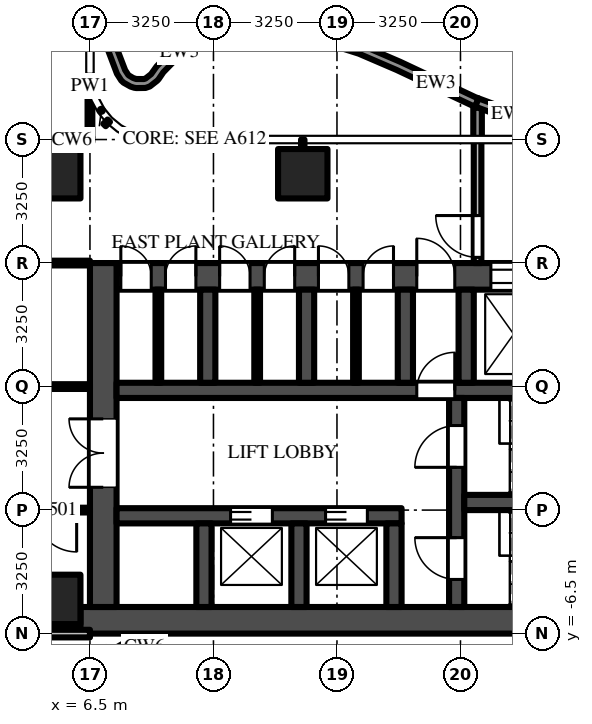
"""IFC4 building model, lengths in metres.
Left out: names, types, materials, properties, quantities, classifications, styles, units other than length and angle.
Written with IfcOpenShell. Run it as: python <this file> out.ifc"""

import sys

from ifc_helpers import new_model, si_unit, direction, frame, frame_2d, origin, origin_2d, place, context, subcontext, project, spatial, polyline, rectangle, outline, extrude, source, transform, mapped, element, fill, save


model = new_model("IFC4")
c1 = context("Model", 3, precision=1e-05, world=origin(), true_north=direction((0.0, 1.0)))
c2 = subcontext(c1, "Body", "Model", "MODEL_VIEW")
j1 = project(units=[si_unit("LENGTHUNIT", "METRE"), si_unit("PLANEANGLEUNIT", "RADIAN")], contexts=[c1])
p1 = place(None, origin())
s1 = spatial("IfcSite", under=j1, at=p1, CompositionType="ELEMENT")
p2 = place(p1, origin())
s2 = spatial("IfcBuilding", under=s1, at=p2, CompositionType="ELEMENT")
p3 = place(p2, frame((0.0, 0.0, 92.5)))
s3 = spatial("IfcBuildingStorey", under=s2, at=p3, CompositionType="ELEMENT", Elevation=92.5)
m1 = source(origin(), c2, "Body", "SweptSolid", [
    extrude(rectangle(XDim=1.3, YDim=1.3, at=origin_2d()), origin(), (0.0, 0.0, 1.0), 5.0),
])
for number, where, z_axis, x_axis in (
    (1, (12.1, 5.6, 0.0), (0.0, 0.0, 1.0), (1.0, 0.0, 0.0)),
    (2, (5.6, 5.6, 0.0), (0.0, 0.0, 1.0), (1.0, 0.0, 0.0)),
    (3, (5.6, -5.6, 0.0), (0.0, 0.0, 1.0), (1.0, 0.0, 0.0)),
):
    element("IfcColumn", number, at=place(p3, frame(where, z_axis=z_axis, x_axis=x_axis)), inside=s3, PredefinedType="COLUMN", context=c2, shape_type="MappedRepresentation", body=[
        mapped(m1, transform((0.0, 0.0, 0.0))),
    ])
m2 = source(origin(), c2, "Body", "SweptSolid", [
    extrude(rectangle(XDim=16.5, YDim=0.7, at=frame_2d((8.25, 0.0))), origin(), (0.0, 0.0, 1.0), 4.75),
])
p4 = place(p3, frame((6.25, -6.15, 0.0), z_axis=(0.0, 0.0, 1.0), x_axis=(1.0, 0.0, 0.0)))
e4 = element("IfcWall", 4, at=p4, inside=s3, PredefinedType="SHEAR", context=c2, shape_type="MappedRepresentation", body=[
    mapped(m2, transform((0.0, 0.0, 0.0))),
])
m3 = source(origin(), c2, "Body", "SweptSolid", [
    extrude(rectangle(XDim=14.85, YDim=0.7, at=frame_2d((7.425, 0.0))), origin(), (0.0, 0.0, 1.0), 4.75),
])
p5 = place(p3, frame((7.2, 2.9, 0.0), z_axis=(0.0, 0.0, 1.0), x_axis=(1.0, 0.0, 0.0)))
e5 = element("IfcWall", 5, at=p5, inside=s3, PredefinedType="SHEAR", context=c2, shape_type="MappedRepresentation", body=[
    mapped(m3, transform((0.0, 0.0, 0.0))),
])
m4 = source(origin(), c2, "Body", "SweptSolid", [
    extrude(rectangle(XDim=1.3, YDim=2.1, at=frame_2d((0.65, 1.05))), frame((0.0, 0.36, 0.0), z_axis=(0.0, -1.0, 0.0), x_axis=(1.0, 0.0, 0.0)), (0.0, 0.0, 1.0), 0.72),
])
p6 = place(p5, frame((12.2, 0.0, 0.0)))
e6 = element("IfcOpeningElement", 6, at=p6, cuts=e5, PredefinedType="OPENING", context=c2, shape_type="MappedRepresentation", body=[
    mapped(m4, transform((0.0, 0.0, 0.0))),
])
m5 = source(origin(), c2, "Body", "SweptSolid", [
    extrude(rectangle(XDim=1.2, YDim=2.1, at=frame_2d((0.6, 1.05))), frame((0.0, 0.36, 0.0), z_axis=(0.0, -1.0, 0.0), x_axis=(1.0, 0.0, 0.0)), (0.0, 0.0, 1.0), 0.72),
])
p7 = place(p5, frame((9.85, 0.0, 0.0)))
e7 = element("IfcOpeningElement", 7, at=p7, cuts=e5, PredefinedType="OPENING", context=c2, shape_type="MappedRepresentation", body=[
    mapped(m5, transform((0.0, 0.0, 0.0))),
])
m6 = source(origin(), c2, "Body", "SweptSolid", [
    extrude(rectangle(XDim=1.0, YDim=2.1, at=frame_2d((0.5, 1.05))), frame((0.0, 0.36, 0.0), z_axis=(0.0, -1.0, 0.0), x_axis=(1.0, 0.0, 0.0)), (0.0, 0.0, 1.0), 0.72),
])
p8 = place(p5, frame((7.9, 0.0, 0.0)))
e8 = element("IfcOpeningElement", 8, at=p8, cuts=e5, PredefinedType="OPENING", context=c2, shape_type="MappedRepresentation", body=[
    mapped(m6, transform((0.0, 0.0, 0.0))),
])
m7 = source(origin(), c2, "Body", "SweptSolid", [
    extrude(rectangle(XDim=0.8, YDim=2.1, at=frame_2d((0.4, 1.05))), frame((0.0, 0.36, 0.0), z_axis=(0.0, -1.0, 0.0), x_axis=(1.0, 0.0, 0.0)), (0.0, 0.0, 1.0), 0.72),
])
p9 = place(p5, frame((0.113, 0.0, 0.0)))
e9 = element("IfcOpeningElement", 9, at=p9, cuts=e5, PredefinedType="OPENING", context=c2, shape_type="MappedRepresentation", body=[
    mapped(m7, transform((0.0, 0.0, 0.0))),
])
p10 = place(p5, frame((1.288, 0.0, 0.0)))
e10 = element("IfcOpeningElement", 10, at=p10, cuts=e5, PredefinedType="OPENING", context=c2, shape_type="MappedRepresentation", body=[
    mapped(m7, transform((0.0, 0.0, 0.0))),
])
p11 = place(p5, frame((2.712, 0.0, 0.0)))
e11 = element("IfcOpeningElement", 11, at=p11, cuts=e5, PredefinedType="OPENING", context=c2, shape_type="MappedRepresentation", body=[
    mapped(m7, transform((0.0, 0.0, 0.0))),
])
p12 = place(p5, frame((3.887, 0.0, 0.0)))
e12 = element("IfcOpeningElement", 12, at=p12, cuts=e5, PredefinedType="OPENING", context=c2, shape_type="MappedRepresentation", body=[
    mapped(m7, transform((0.0, 0.0, 0.0))),
])
p13 = place(p5, frame((5.312, 0.0, 0.0)))
e13 = element("IfcOpeningElement", 13, at=p13, cuts=e5, PredefinedType="OPENING", context=c2, shape_type="MappedRepresentation", body=[
    mapped(m7, transform((0.0, 0.0, 0.0))),
])
p14 = place(p5, frame((6.488, 0.0, 0.0)))
e14 = element("IfcOpeningElement", 14, at=p14, cuts=e5, PredefinedType="OPENING", context=c2, shape_type="MappedRepresentation", body=[
    mapped(m7, transform((0.0, 0.0, 0.0))),
])
m8 = source(origin(), c2, "Body", "SweptSolid", [
    extrude(rectangle(XDim=9.05, YDim=0.7, at=frame_2d((4.525, 0.0))), origin(), (0.0, 0.0, 1.0), 4.75),
])
p15 = place(p3, frame((6.85, -5.8, 0.0), z_axis=(0.0, 0.0, 1.0), x_axis=(0.0, 1.0, 0.0)))
e15 = element("IfcWall", 15, at=p15, inside=s3, PredefinedType="SHEAR", context=c2, shape_type="MappedRepresentation", body=[
    mapped(m8, transform((0.0, 0.0, 0.0))),
])
m9 = source(origin(), c2, "Body", "SweptSolid", [
    extrude(rectangle(XDim=1.8, YDim=2.1, at=frame_2d((0.9, 1.05))), frame((0.0, 0.36, 0.0), z_axis=(0.0, -1.0, 0.0), x_axis=(1.0, 0.0, 0.0)), (0.0, 0.0, 1.0), 0.72),
])
p16 = place(p15, frame((3.15, 0.0, 0.0)))
e16 = element("IfcOpeningElement", 16, at=p16, cuts=e15, PredefinedType="OPENING", context=c2, shape_type="MappedRepresentation", body=[
    mapped(m9, transform((0.0, 0.0, 0.0))),
])
m10 = source(origin(), c2, "Body", "SweptSolid", [
    extrude(rectangle(XDim=7.5, YDim=0.4, at=frame_2d((3.75, 0.0))), origin(), (0.0, 0.0, 1.0), 4.75),
])
p17 = place(p3, frame((7.2, -3.4, 0.0), z_axis=(0.0, 0.0, 1.0), x_axis=(1.0, 0.0, 0.0)))
e17 = element("IfcWall", 17, at=p17, inside=s3, PredefinedType="SHEAR", context=c2, shape_type="MappedRepresentation", body=[
    mapped(m10, transform((0.0, 0.0, 0.0))),
])
m11 = source(origin(), c2, "Body", "SweptSolid", [
    extrude(rectangle(XDim=1.1, YDim=2.1, at=frame_2d((0.55, 1.05))), frame((0.0, 0.21, 0.0), z_axis=(0.0, -1.0, 0.0), x_axis=(1.0, 0.0, 0.0)), (0.0, 0.0, 1.0), 0.42),
])
p18 = place(p17, frame((3.0, 0.0, 0.0)))
e18 = element("IfcOpeningElement", 18, at=p18, cuts=e17, PredefinedType="OPENING", context=c2, shape_type="MappedRepresentation", body=[
    mapped(m11, transform((0.0, 0.0, 0.0))),
])
p19 = place(p17, frame((5.5, 0.0, 0.0)))
e19 = element("IfcOpeningElement", 19, at=p19, cuts=e17, PredefinedType="OPENING", context=c2, shape_type="MappedRepresentation", body=[
    mapped(m11, transform((0.0, 0.0, 0.0))),
])
m12 = source(origin(), c2, "Body", "SweptSolid", [
    extrude(rectangle(XDim=14.85, YDim=0.4, at=frame_2d((7.425, 0.0))), origin(), (0.0, 0.0, 1.0), 4.75),
])
p20 = place(p3, frame((7.2, -0.1, 0.0), z_axis=(0.0, 0.0, 1.0), x_axis=(1.0, 0.0, 0.0)))
e20 = element("IfcWall", 20, at=p20, inside=s3, PredefinedType="SHEAR", context=c2, shape_type="MappedRepresentation", body=[
    mapped(m12, transform((0.0, 0.0, 0.0))),
])
m13 = source(origin(), c2, "Body", "SweptSolid", [
    extrude(rectangle(XDim=1.0, YDim=2.1, at=frame_2d((0.5, 1.05))), frame((0.0, 0.21, 0.0), z_axis=(0.0, -1.0, 0.0), x_axis=(1.0, 0.0, 0.0)), (0.0, 0.0, 1.0), 0.42),
])
p21 = place(p20, frame((7.9, 0.0, 0.0)))
e21 = element("IfcOpeningElement", 21, at=p21, cuts=e20, PredefinedType="OPENING", context=c2, shape_type="MappedRepresentation", body=[
    mapped(m13, transform((0.0, 0.0, 0.0))),
])
m14 = source(origin(), c2, "Body", "SweptSolid", [
    extrude(rectangle(XDim=5.5, YDim=0.4, at=frame_2d((2.75, 0.0))), origin(), (0.0, 0.0, 1.0), 4.75),
])
p22 = place(p3, frame((16.15, -5.8, 0.0), z_axis=(0.0, 0.0, 1.0), x_axis=(0.0, 1.0, 0.0)))
e22 = element("IfcWall", 22, at=p22, inside=s3, PredefinedType="SHEAR", context=c2, shape_type="MappedRepresentation", body=[
    mapped(m14, transform((0.0, 0.0, 0.0))),
])
p23 = place(p22, frame((0.725, 0.0, 0.0)))
e23 = element("IfcOpeningElement", 23, at=p23, cuts=e22, PredefinedType="OPENING", context=c2, shape_type="MappedRepresentation", body=[
    mapped(m11, transform((0.0, 0.0, 0.0))),
])
p24 = place(p22, frame((3.675, 0.0, 0.0)))
e24 = element("IfcOpeningElement", 24, at=p24, cuts=e22, PredefinedType="OPENING", context=c2, shape_type="MappedRepresentation", body=[
    mapped(m11, transform((0.0, 0.0, 0.0))),
])
m15 = source(origin(), c2, "Body", "SweptSolid", [
    extrude(rectangle(XDim=5.7, YDim=0.4, at=frame_2d((2.85, 0.0))), origin(), (0.0, 0.0, 1.0), 4.75),
])
p25 = place(p3, frame((16.35, -3.05, 0.0), z_axis=(0.0, 0.0, 1.0), x_axis=(1.0, 0.0, 0.0)))
e25 = element("IfcWall", 25, at=p25, inside=s3, PredefinedType="SHEAR", context=c2, shape_type="MappedRepresentation", body=[
    mapped(m15, transform((0.0, 0.0, 0.0))),
])
m16 = source(origin(), c2, "Body", "SweptSolid", [
    extrude(rectangle(XDim=2.2, YDim=0.4, at=frame_2d((1.1, 0.0))), origin(), (0.0, 0.0, 1.0), 4.75),
])
for number, where, z_axis, x_axis in (
    (26, (9.5, -5.8, 0.0), (0.0, 0.0, 1.0), (0.0, 1.0, 0.0)),
    (27, (12.0, -5.8, 0.0), (0.0, 0.0, 1.0), (0.0, 1.0, 0.0)),
    (28, (14.5, -5.8, 0.0), (0.0, 0.0, 1.0), (0.0, 1.0, 0.0)),
):
    element("IfcWall", number, at=place(p3, frame(where, z_axis=z_axis, x_axis=x_axis)), inside=s3, PredefinedType="SHEAR", context=c2, shape_type="MappedRepresentation", body=[
        mapped(m16, transform((0.0, 0.0, 0.0))),
    ])
m17 = source(origin(), c2, "Body", "SweptSolid", [
    extrude(rectangle(XDim=2.45, YDim=0.4, at=frame_2d((1.225, 0.0))), origin(), (0.0, 0.0, 1.0), 4.75),
])
for number, where, z_axis, x_axis in (
    (29, (9.6, 0.1, 0.0), (0.0, 0.0, 1.0), (0.0, 1.0, 0.0)),
    (30, (12.2, 0.1, 0.0), (0.0, 0.0, 1.0), (0.0, 1.0, 0.0)),
    (31, (14.8, 0.1, 0.0), (0.0, 0.0, 1.0), (0.0, 1.0, 0.0)),
    (32, (16.4, 0.1, 0.0), (0.0, 0.0, 1.0), (0.0, 1.0, 0.0)),
):
    element("IfcWall", number, at=place(p3, frame(where, z_axis=z_axis, x_axis=x_axis)), inside=s3, PredefinedType="SHEAR", context=c2, shape_type="MappedRepresentation", body=[
        mapped(m17, transform((0.0, 0.0, 0.0))),
    ])
m18 = source(origin(), c2, "Body", "SweptSolid", [
    extrude(rectangle(XDim=3.25, YDim=0.2, at=frame_2d((1.625, 0.0))), origin(), (0.0, 0.0, 1.0), 4.75),
])
p26 = place(p3, frame((16.7, 3.25, 0.0), z_axis=(0.0, 0.0, 1.0), x_axis=(0.0, 1.0, 0.0)))
e33 = element("IfcWall", 33, at=p26, inside=s3, PredefinedType="PARTITIONING", context=c2, shape_type="MappedRepresentation", body=[
    mapped(m18, transform((0.0, 0.0, 0.0))),
])
m19 = source(origin(), c2, "Body", "SweptSolid", [
    extrude(rectangle(XDim=1.1, YDim=2.1, at=frame_2d((0.55, 1.05))), frame((0.0, 0.11, 0.0), z_axis=(0.0, -1.0, 0.0), x_axis=(1.0, 0.0, 0.0)), (0.0, 0.0, 1.0), 0.22),
])
p27 = place(p26, frame((0.15, 0.0, 0.0)))
e34 = element("IfcOpeningElement", 34, at=p27, cuts=e33, PredefinedType="OPENING", context=c2, shape_type="MappedRepresentation", body=[
    mapped(m19, transform((0.0, 0.0, 0.0))),
])
m20 = source(origin(), c2, "Body", "SweptSolid", [
    extrude(rectangle(XDim=2.45, YDim=0.15, at=frame_2d((1.225, 0.0))), origin(), (0.0, 0.0, 1.0), 4.75),
])
for number, where, z_axis, x_axis in (
    (35, (8.3, 0.1, 0.0), (0.0, 0.0, 1.0), (0.0, 1.0, 0.0)),
    (36, (10.9, 0.1, 0.0), (0.0, 0.0, 1.0), (0.0, 1.0, 0.0)),
    (37, (13.5, 0.1, 0.0), (0.0, 0.0, 1.0), (0.0, 1.0, 0.0)),
):
    element("IfcWall", number, at=place(p3, frame(where, z_axis=z_axis, x_axis=x_axis)), inside=s3, PredefinedType="PARTITIONING", context=c2, shape_type="MappedRepresentation", body=[
        mapped(m20, transform((0.0, 0.0, 0.0))),
    ])
p28 = place(p3, frame((16.7, 6.5, 0.0), z_axis=(0.0, 0.0, 1.0), x_axis=(0.0, 1.0, 0.0)))
e38 = element("IfcWall", 38, at=p28, inside=s3, PredefinedType="PARAPET", context=c2, shape_type="SweptSolid", body=[
    extrude(rectangle(XDim=0.842, YDim=0.225, at=frame_2d((0.421, 0.0))), origin(), (0.0, 0.0, 1.0), 1.1),
])
p29 = place(p3, origin())
e39 = element("IfcWall", 39, at=p29, inside=s3, PredefinedType="PARAPET", context=c2, shape_type="SweptSolid", body=[
    extrude(outline(polyline([(7.026, 9.776), (7.168, 9.001), (7.426, 8.327), (7.504, 8.206), (7.526, 8.185), (7.637, 8.12), (7.715, 8.093), (7.922, 8.092), (7.963, 8.106), (8.108, 8.22), (8.256, 8.427), (8.657, 8.835), (8.726, 8.875), (9.033, 8.984), (9.114, 8.76), (8.795, 8.644), (8.431, 8.271), (8.307, 8.089), (8.267, 8.046), (8.077, 7.897), (7.963, 7.857), (7.721, 7.854), (7.661, 7.863), (7.566, 7.894), (7.384, 7.997), (7.323, 8.054), (7.211, 8.23), (6.935, 8.961), (6.797, 9.736), (7.026, 9.776)])), origin(), (0.0, 0.0, 1.0), 1.1),
])
e40 = element("IfcWall", 40, at=p29, inside=s3, PredefinedType="PARAPET", context=c2, shape_type="SweptSolid", body=[
    extrude(outline(polyline([(9.033, 8.984), (9.649, 9.205), (10.668, 9.417), (11.698, 9.444), (12.691, 9.285), (13.069, 9.166), (12.998, 8.942), (12.628, 9.059), (11.672, 9.21), (10.685, 9.183), (9.721, 8.981), (9.114, 8.76), (9.033, 8.984)])), origin(), (0.0, 0.0, 1.0), 1.1),
])
e41 = element("IfcWall", 41, at=p29, inside=s3, PredefinedType="PARAPET", context=c2, shape_type="SweptSolid", body=[
    extrude(outline(polyline([(13.069, 9.166), (13.649, 8.982), (14.668, 8.544), (16.642, 7.615), (16.722, 7.585), (16.64, 7.365), (16.546, 7.4), (14.57, 8.33), (13.573, 8.759), (12.998, 8.942), (13.069, 9.166)])), origin(), (0.0, 0.0, 1.0), 1.1),
])
e42 = element("IfcWall", 42, at=p29, inside=s3, PredefinedType="PARAPET", context=c2, shape_type="SweptSolid", body=[
    extrude(outline(polyline([(16.722, 7.585), (17.626, 7.249), (18.612, 7.022), (19.605, 6.967), (20.486, 7.083), (20.517, 6.851), (19.637, 6.733), (18.602, 6.786), (17.552, 7.026), (16.64, 7.365), (16.722, 7.585)])), origin(), (0.0, 0.0, 1.0), 1.1),
])
e43 = element("IfcWall", 43, at=p29, inside=s3, PredefinedType="PARAPET", context=c2, shape_type="SweptSolid", body=[
    extrude(outline(polyline([(7.857, -7.083), (7.711, -7.122), (7.388, -7.342), (7.301, -7.435), (7.285, -7.461), (7.243, -7.599), (7.207, -8.036), (7.23, -8.201), (7.518, -8.968), (7.298, -9.05), (6.995, -8.231), (6.972, -8.03), (7.01, -7.566), (7.069, -7.365), (7.111, -7.293), (7.226, -7.171), (7.542, -6.953), (7.154, -7.206), (7.025, -7.009), (7.575, -6.65), (7.704, -6.847), (7.604, -6.912), (7.658, -6.888), (7.72, -6.873), (7.857, -7.083)])), origin(), (0.0, 0.0, 1.0), 1.1),
])
m21 = source(origin(), c2, "Body", "SweptSolid", [
    extrude(rectangle(XDim=1.469, YDim=0.125, at=frame_2d((0.734, 0.0))), origin(), (0.0, 0.0, 1.0), 4.75),
])
p30 = place(p3, frame((6.5, 6.562, 0.0), z_axis=(0.0, 0.0, 1.0), x_axis=(0.0, 1.0, 0.0)))
e44 = element("IfcWall", 44, at=p30, inside=s3, PredefinedType="PARTITIONING", context=c2, shape_type="MappedRepresentation", body=[
    mapped(m21, transform((0.0, 0.0, 0.0))),
])
p31 = place(p3, frame((1.262, -6.5, 0.0), z_axis=(0.0, 0.0, 1.0), x_axis=(1.0, 0.0, 0.0)))
e45 = element("IfcWall", 45, at=p31, inside=s3, PredefinedType="PARTITIONING", context=c2, shape_type="SweptSolid", body=[
    extrude(rectangle(XDim=5.238, YDim=0.2, at=frame_2d((2.619, 0.0))), origin(), (0.0, 0.0, 1.0), 4.23),
])
m22 = source(origin(), c2, "Body", "SweptSolid", [
    extrude(rectangle(XDim=5.363, YDim=0.125, at=frame_2d((2.681, 0.0))), origin(), (0.0, 0.0, 1.0), 3.968),
])
p32 = place(p3, frame((6.5, -3.25, 0.0), z_axis=(0.0, 0.0, 1.0), x_axis=(-1.0, 0.0, 0.0)))
e46 = element("IfcWall", 46, at=p32, inside=s3, PredefinedType="PARTITIONING", context=c2, shape_type="MappedRepresentation", body=[
    mapped(m22, transform((0.0, 0.0, 0.0))),
])
m23 = source(origin(), c2, "Body", "SweptSolid", [
    extrude(rectangle(XDim=1.1, YDim=2.1, at=frame_2d((0.55, 1.05))), frame((0.0, 0.073, 0.0), z_axis=(0.0, -1.0, 0.0), x_axis=(1.0, 0.0, 0.0)), (0.0, 0.0, 1.0), 0.145),
])
p33 = place(p32, frame((0.35, 0.0, 0.0)))
e47 = element("IfcOpeningElement", 47, at=p33, cuts=e46, PredefinedType="OPENING", context=c2, shape_type="MappedRepresentation", body=[
    mapped(m23, transform((0.0, 0.0, 0.0))),
])
p34 = place(p3, frame((6.5, 0.0, 0.0), z_axis=(0.0, 0.0, 1.0), x_axis=(-1.0, 0.0, 0.0)))
e48 = element("IfcWall", 48, at=p34, inside=s3, PredefinedType="PARTITIONING", context=c2, shape_type="MappedRepresentation", body=[
    mapped(m22, transform((0.0, 0.0, 0.0))),
])
m24 = source(origin(), c2, "Body", "SweptSolid", [
    extrude(rectangle(XDim=1.0, YDim=2.1, at=frame_2d((0.5, 1.05))), frame((0.0, 0.073, 0.0), z_axis=(0.0, -1.0, 0.0), x_axis=(1.0, 0.0, 0.0)), (0.0, 0.0, 1.0), 0.145),
])
p35 = place(p34, frame((3.95, 0.0, 0.0)))
e49 = element("IfcOpeningElement", 49, at=p35, cuts=e48, PredefinedType="OPENING", context=c2, shape_type="MappedRepresentation", body=[
    mapped(m24, transform((0.0, 0.0, 0.0))),
])
p36 = place(p3, frame((1.137, 3.25, 0.0), z_axis=(0.0, 0.0, 1.0), x_axis=(1.0, 0.0, 0.0)))
e50 = element("IfcWall", 50, at=p36, inside=s3, PredefinedType="PARTITIONING", context=c2, shape_type="MappedRepresentation", body=[
    mapped(m22, transform((0.0, 0.0, 0.0))),
])
m25 = source(origin(), c2, "Body", "SweptSolid", [
    extrude(rectangle(XDim=5.425, YDim=0.125, at=frame_2d((2.712, 0.0))), origin(), (0.0, 0.0, 1.0), 4.23),
])
p37 = place(p3, frame((1.137, 6.5, 0.0), z_axis=(0.0, 0.0, 1.0), x_axis=(1.0, 0.0, 0.0)))
e51 = element("IfcWall", 51, at=p37, inside=s3, PredefinedType="PARTITIONING", context=c2, shape_type="MappedRepresentation", body=[
    mapped(m25, transform((0.0, 0.0, 0.0))),
])
m26 = source(origin(), c2, "Body", "SweptSolid", [
    extrude(rectangle(XDim=1.1, YDim=2.1, at=frame_2d((0.55, 1.05))), frame((0.0, 0.025, 0.0), z_axis=(0.0, -1.0, 0.0), x_axis=(1.0, 0.0, 0.0)), (0.0, 0.0, 1.0), 0.05),
])
p38 = place(p18, origin())
e52 = element("IfcDoor", 52, at=p38, inside=s3, OperationType="DOUBLE_DOOR_SLIDING", PredefinedType="DOOR", context=c2, shape_type="MappedRepresentation", body=[
    mapped(m26, transform((0.0, 0.0, 0.0))),
])
fill(e18, e52)
p39 = place(p19, origin())
e53 = element("IfcDoor", 53, at=p39, inside=s3, OperationType="DOUBLE_DOOR_SLIDING", PredefinedType="DOOR", context=c2, shape_type="MappedRepresentation", body=[
    mapped(m26, transform((0.0, 0.0, 0.0))),
])
fill(e19, e53)
m27 = source(origin(), c2, "Body", "SweptSolid", [
    extrude(rectangle(XDim=1.2, YDim=2.1, at=frame_2d((0.6, 1.05))), frame((0.0, -0.275, 0.0), z_axis=(0.0, -1.0, 0.0), x_axis=(1.0, 0.0, 0.0)), (0.0, 0.0, 1.0), 0.05),
])
p40 = place(p7, origin())
e54 = element("IfcDoor", 54, at=p40, inside=s3, OperationType="DOUBLE_DOOR_SLIDING", PredefinedType="DOOR", context=c2, shape_type="MappedRepresentation", body=[
    mapped(m27, transform((0.0, 0.0, 0.0))),
])
fill(e7, e54)
m28 = source(origin(), c2, "Body", "SweptSolid", [
    extrude(rectangle(XDim=1.8, YDim=2.1, at=frame_2d((0.9, 1.05))), frame((0.0, -0.275, 0.0), z_axis=(0.0, -1.0, 0.0), x_axis=(1.0, 0.0, 0.0)), (0.0, 0.0, 1.0), 0.05),
])
p41 = place(p16, origin())
e55 = element("IfcDoor", 55, at=p41, inside=s3, OperationType="DOUBLE_DOOR_SINGLE_SWING", PredefinedType="DOOR", context=c2, shape_type="MappedRepresentation", body=[
    mapped(m28, transform((0.0, 0.0, 0.0))),
])
fill(e16, e55)
p42 = place(p23, origin())
e56 = element("IfcDoor", 56, at=p42, inside=s3, OperationType="SINGLE_SWING_RIGHT", PredefinedType="DOOR", context=c2, shape_type="MappedRepresentation", body=[
    mapped(m26, transform((0.0, 0.0, 0.0))),
])
fill(e23, e56)
p43 = place(p24, origin())
e57 = element("IfcDoor", 57, at=p43, inside=s3, OperationType="SINGLE_SWING_LEFT", PredefinedType="DOOR", context=c2, shape_type="MappedRepresentation", body=[
    mapped(m26, transform((0.0, 0.0, 0.0))),
])
fill(e24, e57)
m29 = source(origin(), c2, "Body", "SweptSolid", [
    extrude(rectangle(XDim=1.0, YDim=2.1, at=frame_2d((0.5, 1.05))), frame((0.0, 0.025, 0.0), z_axis=(0.0, -1.0, 0.0), x_axis=(1.0, 0.0, 0.0)), (0.0, 0.0, 1.0), 0.05),
])
p44 = place(p21, origin())
e58 = element("IfcDoor", 58, at=p44, inside=s3, OperationType="SINGLE_SWING_RIGHT", PredefinedType="DOOR", context=c2, shape_type="MappedRepresentation", body=[
    mapped(m29, transform((0.0, 0.0, 0.0))),
])
fill(e21, e58)
m30 = source(origin(), c2, "Body", "SweptSolid", [
    extrude(rectangle(XDim=1.0, YDim=2.1, at=frame_2d((0.5, 1.05))), frame((0.0, -0.275, 0.0), z_axis=(0.0, -1.0, 0.0), x_axis=(1.0, 0.0, 0.0)), (0.0, 0.0, 1.0), 0.05),
])
p45 = place(p8, origin())
e59 = element("IfcDoor", 59, at=p45, inside=s3, OperationType="SINGLE_SWING_LEFT", PredefinedType="DOOR", context=c2, shape_type="MappedRepresentation", body=[
    mapped(m30, transform((0.0, 0.0, 0.0))),
])
fill(e8, e59)
p46 = place(p27, origin())
e60 = element("IfcDoor", 60, at=p46, inside=s3, OperationType="SINGLE_SWING_RIGHT", PredefinedType="DOOR", context=c2, shape_type="MappedRepresentation", body=[
    mapped(m26, transform((0.0, 0.0, 0.0))),
])
fill(e34, e60)
m31 = source(origin(), c2, "Body", "SweptSolid", [
    extrude(rectangle(XDim=0.8, YDim=2.1, at=frame_2d((0.4, 1.05))), frame((0.0, -0.275, 0.0), z_axis=(0.0, -1.0, 0.0), x_axis=(1.0, 0.0, 0.0)), (0.0, 0.0, 1.0), 0.05),
])
p47 = place(p9, origin())
e61 = element("IfcDoor", 61, at=p47, inside=s3, OperationType="SINGLE_SWING_LEFT", PredefinedType="DOOR", context=c2, shape_type="MappedRepresentation", body=[
    mapped(m31, transform((0.0, 0.0, 0.0))),
])
fill(e9, e61)
p48 = place(p10, origin())
e62 = element("IfcDoor", 62, at=p48, inside=s3, OperationType="SINGLE_SWING_RIGHT", PredefinedType="DOOR", context=c2, shape_type="MappedRepresentation", body=[
    mapped(m31, transform((0.0, 0.0, 0.0))),
])
fill(e10, e62)
p49 = place(p11, origin())
e63 = element("IfcDoor", 63, at=p49, inside=s3, OperationType="SINGLE_SWING_LEFT", PredefinedType="DOOR", context=c2, shape_type="MappedRepresentation", body=[
    mapped(m31, transform((0.0, 0.0, 0.0))),
])
fill(e11, e63)
p50 = place(p12, origin())
e64 = element("IfcDoor", 64, at=p50, inside=s3, OperationType="SINGLE_SWING_RIGHT", PredefinedType="DOOR", context=c2, shape_type="MappedRepresentation", body=[
    mapped(m31, transform((0.0, 0.0, 0.0))),
])
fill(e12, e64)
p51 = place(p13, origin())
e65 = element("IfcDoor", 65, at=p51, inside=s3, OperationType="SINGLE_SWING_LEFT", PredefinedType="DOOR", context=c2, shape_type="MappedRepresentation", body=[
    mapped(m31, transform((0.0, 0.0, 0.0))),
])
fill(e13, e65)
p52 = place(p14, origin())
e66 = element("IfcDoor", 66, at=p52, inside=s3, OperationType="SINGLE_SWING_RIGHT", PredefinedType="DOOR", context=c2, shape_type="MappedRepresentation", body=[
    mapped(m31, transform((0.0, 0.0, 0.0))),
])
fill(e14, e66)
p53 = place(p33, origin())
e67 = element("IfcDoor", 67, at=p53, inside=s3, OperationType="SINGLE_SWING_LEFT", PredefinedType="DOOR", context=c2, shape_type="MappedRepresentation", body=[
    mapped(m26, transform((0.0, 0.0, 0.0))),
])
fill(e47, e67)
save(model, sys.argv[1])
